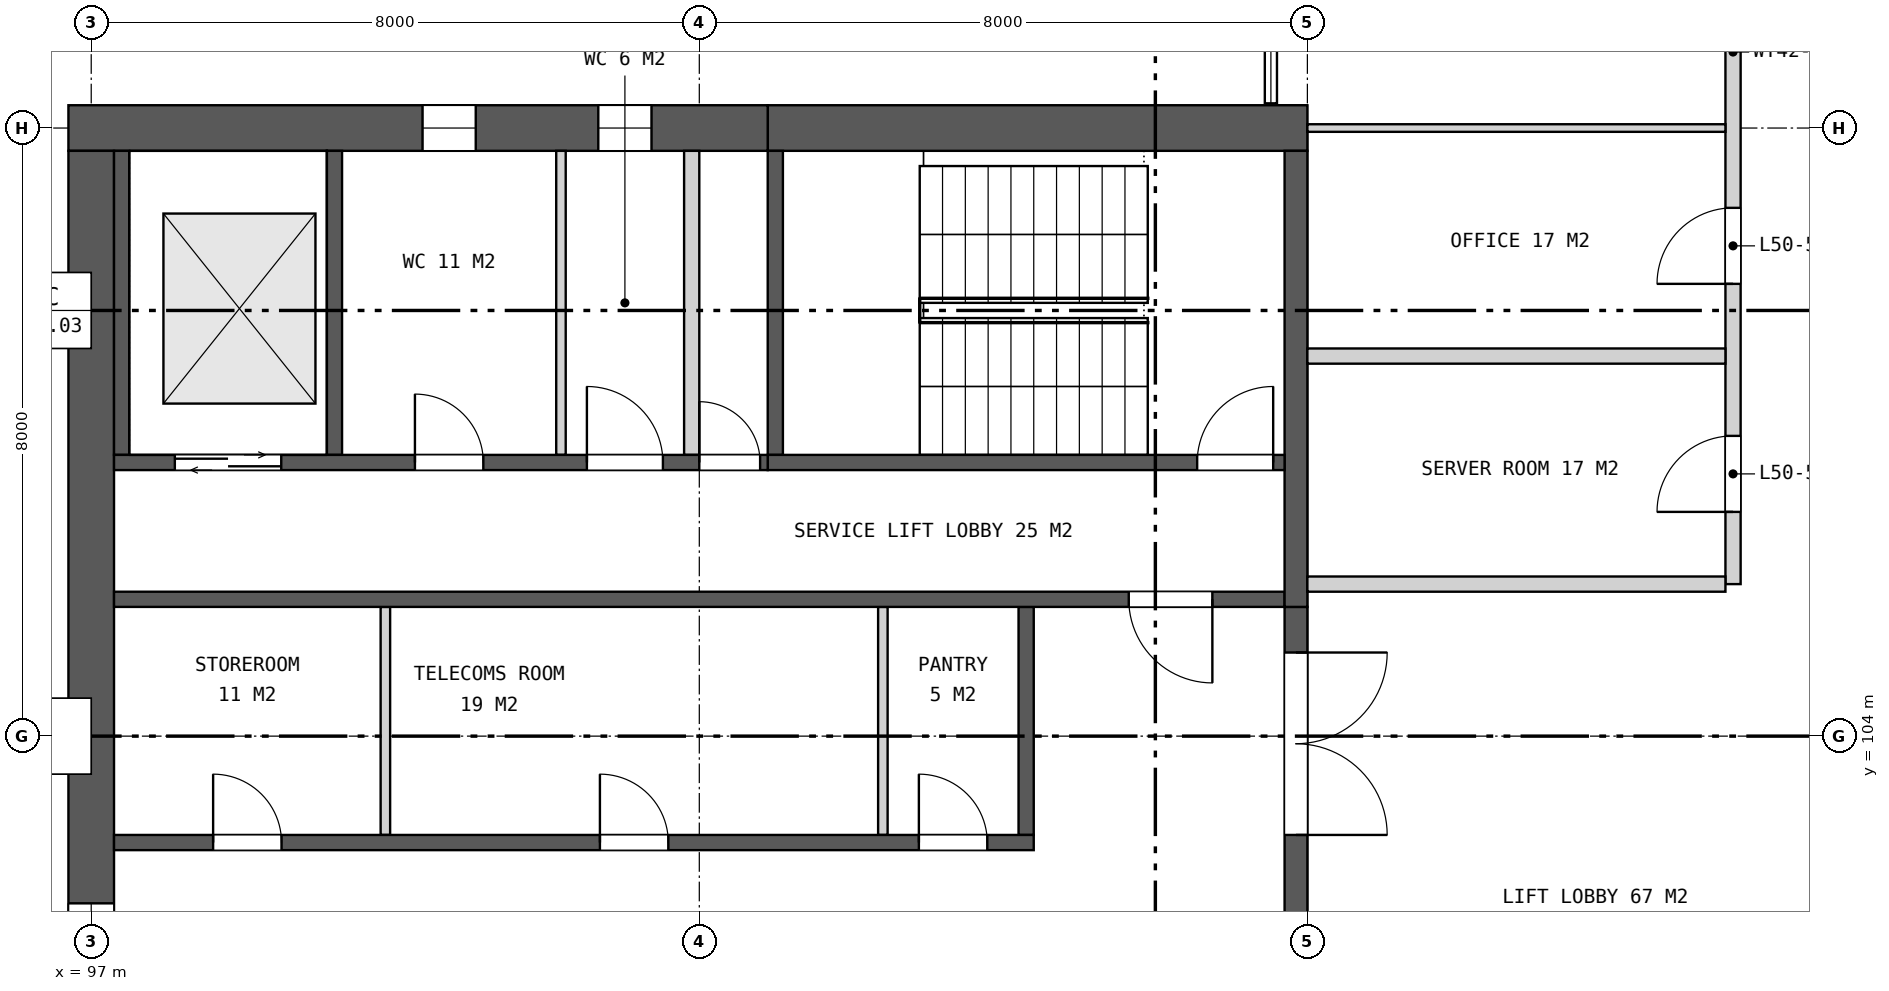
"""IFC4 building model, lengths in metres.
Left out: names, types, materials, properties, quantities, classifications, styles, units other than length and angle.
Written with IfcOpenShell. Run it as: python <this file> out.ifc"""

import sys

from ifc_helpers import new_model, si_unit, direction, frame, frame_2d, origin, place, context, subcontext, project, spatial, rectangle, extrude, element, fill, save


model = new_model("IFC4")
c1 = context("Model", 3, precision=1e-05, world=origin(), true_north=direction((0.0, 1.0)))
c2 = subcontext(c1, "Body", "Model", "MODEL_VIEW")
j1 = project(units=[si_unit("LENGTHUNIT", "METRE"), si_unit("PLANEANGLEUNIT", "RADIAN")], contexts=[c1])
p1 = place(None, origin())
s1 = spatial("IfcSite", under=j1, at=p1, CompositionType="ELEMENT")
p2 = place(p1, origin())
s2 = spatial("IfcBuilding", under=s1, at=p2, CompositionType="ELEMENT")
p3 = place(p2, frame((0.0, 0.0, 233.5)))
s3 = spatial("IfcBuildingStorey", under=s2, at=p3, CompositionType="ELEMENT", Elevation=233.5)
p4 = place(p3, frame((113.0, 112.0, 0.0), z_axis=(0.0, 0.0, 1.0), x_axis=(-1.0, 0.0, 0.0)))
e1 = element("IfcWall", 1, at=p4, inside=s3, PredefinedType="SHEAR", context=c2, shape_type="SweptSolid", body=[
    extrude(rectangle(XDim=7.1, YDim=0.6, at=frame_2d((3.55, 0.0))), origin(), (0.0, 0.0, 1.0), 4.2),
])
p5 = place(p3, frame((105.9, 112.0, 0.0), z_axis=(0.0, 0.0, 1.0), x_axis=(-1.0, 0.0, 0.0)))
e2 = element("IfcWall", 2, at=p5, inside=s3, PredefinedType="SHEAR", context=c2, shape_type="SweptSolid", body=[
    extrude(rectangle(XDim=9.2, YDim=0.6, at=frame_2d((4.6, 0.0))), origin(), (0.0, 0.0, 1.0), 4.2),
])
p6 = place(p5, frame((1.529, 0.0, 1.5)))
e3 = element("IfcOpeningElement", 3, at=p6, cuts=e2, PredefinedType="OPENING", context=c2, shape_type="SweptSolid", body=[
    extrude(rectangle(XDim=0.7, YDim=0.9, at=frame_2d((0.35, 0.45))), frame((0.0, 0.31, 0.0), z_axis=(0.0, -1.0, 0.0), x_axis=(1.0, 0.0, 0.0)), (0.0, 0.0, 1.0), 0.62),
])
p7 = place(p5, frame((3.841, 0.0, 1.5)))
e4 = element("IfcOpeningElement", 4, at=p7, cuts=e2, PredefinedType="OPENING", context=c2, shape_type="SweptSolid", body=[
    extrude(rectangle(XDim=0.7, YDim=0.9, at=frame_2d((0.35, 0.45))), frame((0.0, 0.31, 0.0), z_axis=(0.0, -1.0, 0.0), x_axis=(1.0, 0.0, 0.0)), (0.0, 0.0, 1.0), 0.62),
])
p8 = place(p3, frame((97.0, 111.7, 0.0), z_axis=(0.0, 0.0, 1.0), x_axis=(0.0, -1.0, 0.0)))
e5 = element("IfcWall", 5, at=p8, inside=s3, PredefinedType="SHEAR", context=c2, shape_type="SweptSolid", body=[
    extrude(rectangle(XDim=23.4, YDim=0.6, at=frame_2d((11.7, 0.0))), origin(), (0.0, 0.0, 1.0), 4.2),
])
p9 = place(p8, frame((9.9, 0.0, 0.15)))
e6 = element("IfcOpeningElement", 6, at=p9, cuts=e5, PredefinedType="OPENING", context=c2, shape_type="SweptSolid", body=[
    extrude(rectangle(XDim=3.6, YDim=3.0, at=frame_2d((1.8, 1.5))), frame((0.0, 0.31, 0.0), z_axis=(0.0, -1.0, 0.0), x_axis=(1.0, 0.0, 0.0)), (0.0, 0.0, 1.0), 0.62),
])
p10 = place(p3, frame((112.85, 105.7, 0.0), z_axis=(0.0, 0.0, 1.0), x_axis=(0.0, -1.0, 0.0)))
e7 = element("IfcWall", 7, at=p10, inside=s3, PredefinedType="SHEAR", context=c2, shape_type="SweptSolid", body=[
    extrude(rectangle(XDim=11.4, YDim=0.3, at=frame_2d((5.7, 0.0))), origin(), (0.0, 0.0, 1.0), 4.2),
])
p11 = place(p10, frame((0.6, 0.0, 0.0)))
e8 = element("IfcOpeningElement", 8, at=p11, cuts=e7, PredefinedType="OPENING", context=c2, shape_type="SweptSolid", body=[
    extrude(rectangle(XDim=2.4, YDim=2.4, at=frame_2d((1.2, 1.2))), frame((0.0, 0.16, 0.0), z_axis=(0.0, -1.0, 0.0), x_axis=(1.0, 0.0, 0.0)), (0.0, 0.0, 1.0), 0.32),
])
p12 = place(p10, frame((4.5, 0.0, 0.0)))
e9 = element("IfcOpeningElement", 9, at=p12, cuts=e7, PredefinedType="OPENING", context=c2, shape_type="SweptSolid", body=[
    extrude(rectangle(XDim=2.4, YDim=2.4, at=frame_2d((1.2, 1.2))), frame((0.0, 0.16, 0.0), z_axis=(0.0, -1.0, 0.0), x_axis=(1.0, 0.0, 0.0)), (0.0, 0.0, 1.0), 0.32),
])
p13 = place(p10, frame((8.4, 0.0, 0.0)))
e10 = element("IfcOpeningElement", 10, at=p13, cuts=e7, PredefinedType="OPENING", context=c2, shape_type="SweptSolid", body=[
    extrude(rectangle(XDim=2.4, YDim=2.4, at=frame_2d((1.2, 1.2))), frame((0.0, 0.16, 0.0), z_axis=(0.0, -1.0, 0.0), x_axis=(1.0, 0.0, 0.0)), (0.0, 0.0, 1.0), 0.32),
])
p14 = place(p3, frame((109.3, 105.7, 0.0), z_axis=(0.0, 0.0, 1.0), x_axis=(0.0, -1.0, 0.0)))
e11 = element("IfcWall", 11, at=p14, inside=s3, PredefinedType="SHEAR", context=c2, shape_type="SweptSolid", body=[
    extrude(rectangle(XDim=3.0, YDim=0.2, at=frame_2d((1.5, 0.0))), origin(), (0.0, 0.0, 1.0), 4.2),
])
for number, where, z_axis, x_axis in (
    (12, (107.415, 105.7, 0.0), (0.0, 0.0, 1.0), (0.0, -1.0, 0.0)),
    (13, (100.87, 105.7, 0.0), (0.0, 0.0, 1.0), (0.0, -1.0, 0.0)),
):
    element("IfcWall", number, at=place(p3, frame(where, z_axis=z_axis, x_axis=x_axis)), inside=s3, PredefinedType="PARTITIONING", context=c2, shape_type="SweptSolid", body=[
        extrude(rectangle(XDim=3.0, YDim=0.125, at=frame_2d((1.5, 0.0))), origin(), (0.0, 0.0, 1.0), 4.2),
    ])
p15 = place(p3, frame((109.4, 102.6, 0.0), z_axis=(0.0, 0.0, 1.0), x_axis=(-1.0, 0.0, 0.0)))
e14 = element("IfcWall", 14, at=p15, inside=s3, PredefinedType="SHEAR", context=c2, shape_type="SweptSolid", body=[
    extrude(rectangle(XDim=12.1, YDim=0.2, at=frame_2d((6.05, 0.0))), origin(), (0.0, 0.0, 1.0), 4.2),
])
p16 = place(p15, frame((0.611, 0.0, 0.0)))
e15 = element("IfcOpeningElement", 15, at=p16, cuts=e14, PredefinedType="OPENING", context=c2, shape_type="SweptSolid", body=[
    extrude(rectangle(XDim=0.9, YDim=2.1, at=frame_2d((0.45, 1.05))), frame((0.0, 0.11, 0.0), z_axis=(0.0, -1.0, 0.0), x_axis=(1.0, 0.0, 0.0)), (0.0, 0.0, 1.0), 0.22),
])
p17 = place(p15, frame((4.808, 0.0, 0.0)))
e16 = element("IfcOpeningElement", 16, at=p17, cuts=e14, PredefinedType="OPENING", context=c2, shape_type="SweptSolid", body=[
    extrude(rectangle(XDim=0.9, YDim=2.1, at=frame_2d((0.45, 1.05))), frame((0.0, 0.11, 0.0), z_axis=(0.0, -1.0, 0.0), x_axis=(1.0, 0.0, 0.0)), (0.0, 0.0, 1.0), 0.22),
])
p18 = place(p15, frame((9.896, 0.0, 0.0)))
e17 = element("IfcOpeningElement", 17, at=p18, cuts=e14, PredefinedType="OPENING", context=c2, shape_type="SweptSolid", body=[
    extrude(rectangle(XDim=0.9, YDim=2.1, at=frame_2d((0.45, 1.05))), frame((0.0, 0.11, 0.0), z_axis=(0.0, -1.0, 0.0), x_axis=(1.0, 0.0, 0.0)), (0.0, 0.0, 1.0), 0.22),
])
p19 = place(p3, frame((112.7, 105.8, 0.0), z_axis=(0.0, 0.0, 1.0), x_axis=(-1.0, 0.0, 0.0)))
e18 = element("IfcWall", 18, at=p19, inside=s3, PredefinedType="SHEAR", context=c2, shape_type="SweptSolid", body=[
    extrude(rectangle(XDim=15.4, YDim=0.2, at=frame_2d((7.7, 0.0))), origin(), (0.0, 0.0, 1.0), 4.2),
])
p20 = place(p19, frame((0.95, 0.0, 0.0)))
e19 = element("IfcOpeningElement", 19, at=p20, cuts=e18, PredefinedType="OPENING", context=c2, shape_type="SweptSolid", body=[
    extrude(rectangle(XDim=1.1, YDim=2.1, at=frame_2d((0.55, 1.05))), frame((0.0, 0.11, 0.0), z_axis=(0.0, -1.0, 0.0), x_axis=(1.0, 0.0, 0.0)), (0.0, 0.0, 1.0), 0.22),
])
p21 = place(p3, frame((112.85, 111.7, 0.0), z_axis=(0.0, 0.0, 1.0), x_axis=(0.0, -1.0, 0.0)))
e20 = element("IfcWall", 20, at=p21, inside=s3, PredefinedType="SHEAR", context=c2, shape_type="SweptSolid", body=[
    extrude(rectangle(XDim=6.0, YDim=0.3, at=frame_2d((3.0, 0.0))), origin(), (0.0, 0.0, 1.0), 4.2),
])
for number, where, z_axis, x_axis in (
    (21, (106.0, 111.7, 0.0), (0.0, 0.0, 1.0), (0.0, -1.0, 0.0)),
    (22, (100.2, 111.7, 0.0), (0.0, 0.0, 1.0), (0.0, -1.0, 0.0)),
    (23, (97.4, 111.7, 0.0), (0.0, 0.0, 1.0), (0.0, -1.0, 0.0)),
):
    element("IfcWall", number, at=place(p3, frame(where, z_axis=z_axis, x_axis=x_axis)), inside=s3, PredefinedType="SHEAR", context=c2, shape_type="SweptSolid", body=[
        extrude(rectangle(XDim=4.0, YDim=0.2, at=frame_2d((2.0, 0.0))), origin(), (0.0, 0.0, 1.0), 4.2),
    ])
p22 = place(p3, frame((104.9, 111.7, 0.0), z_axis=(0.0, 0.0, 1.0), x_axis=(0.0, -1.0, 0.0)))
e24 = element("IfcWall", 24, at=p22, inside=s3, PredefinedType="PARTITIONING", context=c2, shape_type="SweptSolid", body=[
    extrude(rectangle(XDim=4.0, YDim=0.2, at=frame_2d((2.0, 0.0))), origin(), (0.0, 0.0, 1.0), 4.2),
])
p23 = place(p3, frame((103.18, 111.7, 0.0), z_axis=(0.0, 0.0, 1.0), x_axis=(0.0, -1.0, 0.0)))
e25 = element("IfcWall", 25, at=p23, inside=s3, PredefinedType="PARTITIONING", context=c2, shape_type="SweptSolid", body=[
    extrude(rectangle(XDim=4.0, YDim=0.125, at=frame_2d((2.0, 0.0))), origin(), (0.0, 0.0, 1.0), 4.2),
])
p24 = place(p3, frame((112.7, 107.6, 0.0), z_axis=(0.0, 0.0, 1.0), x_axis=(-1.0, 0.0, 0.0)))
e26 = element("IfcWall", 26, at=p24, inside=s3, PredefinedType="SHEAR", context=c2, shape_type="SweptSolid", body=[
    extrude(rectangle(XDim=6.8, YDim=0.2, at=frame_2d((3.4, 0.0))), origin(), (0.0, 0.0, 1.0), 4.2),
])
p25 = place(p24, frame((0.15, 0.0, 0.0)))
e27 = element("IfcOpeningElement", 27, at=p25, cuts=e26, PredefinedType="OPENING", context=c2, shape_type="SweptSolid", body=[
    extrude(rectangle(XDim=1.0, YDim=2.1, at=frame_2d((0.5, 1.05))), frame((0.0, 0.11, 0.0), z_axis=(0.0, -1.0, 0.0), x_axis=(1.0, 0.0, 0.0)), (0.0, 0.0, 1.0), 0.22),
])
p26 = place(p3, frame((105.9, 107.6, 0.0), z_axis=(0.0, 0.0, 1.0), x_axis=(-1.0, 0.0, 0.0)))
e28 = element("IfcWall", 28, at=p26, inside=s3, PredefinedType="SHEAR", context=c2, shape_type="SweptSolid", body=[
    extrude(rectangle(XDim=8.6, YDim=0.2, at=frame_2d((4.3, 0.0))), origin(), (0.0, 0.0, 1.0), 4.2),
])
p27 = place(p26, frame((0.1, 0.0, 0.0)))
e29 = element("IfcOpeningElement", 29, at=p27, cuts=e28, PredefinedType="OPENING", context=c2, shape_type="SweptSolid", body=[
    extrude(rectangle(XDim=0.8, YDim=2.1, at=frame_2d((0.4, 1.05))), frame((0.0, 0.11, 0.0), z_axis=(0.0, -1.0, 0.0), x_axis=(1.0, 0.0, 0.0)), (0.0, 0.0, 1.0), 0.22),
])
p28 = place(p26, frame((1.379, 0.0, 0.0)))
e30 = element("IfcOpeningElement", 30, at=p28, cuts=e28, PredefinedType="OPENING", context=c2, shape_type="SweptSolid", body=[
    extrude(rectangle(XDim=1.0, YDim=2.1, at=frame_2d((0.5, 1.05))), frame((0.0, 0.11, 0.0), z_axis=(0.0, -1.0, 0.0), x_axis=(1.0, 0.0, 0.0)), (0.0, 0.0, 1.0), 0.22),
])
p29 = place(p26, frame((3.741, 0.0, 0.0)))
e31 = element("IfcOpeningElement", 31, at=p29, cuts=e28, PredefinedType="OPENING", context=c2, shape_type="SweptSolid", body=[
    extrude(rectangle(XDim=0.9, YDim=2.1, at=frame_2d((0.45, 1.05))), frame((0.0, 0.11, 0.0), z_axis=(0.0, -1.0, 0.0), x_axis=(1.0, 0.0, 0.0)), (0.0, 0.0, 1.0), 0.22),
])
p30 = place(p26, frame((6.4, 0.0, 0.0)))
e32 = element("IfcOpeningElement", 32, at=p30, cuts=e28, PredefinedType="OPENING", context=c2, shape_type="SweptSolid", body=[
    extrude(rectangle(XDim=1.4, YDim=2.1, at=frame_2d((0.7, 1.05))), frame((0.0, 0.11, 0.0), z_axis=(0.0, -1.0, 0.0), x_axis=(1.0, 0.0, 0.0)), (0.0, 0.0, 1.0), 0.22),
])
p31 = place(p3, frame((118.6, 106.0, 0.0), z_axis=(0.0, 0.0, 1.0), x_axis=(0.0, 1.0, 0.0)))
e33 = element("IfcWall", 33, at=p31, inside=s3, PredefinedType="SOLIDWALL", context=c2, shape_type="SweptSolid", body=[
    extrude(rectangle(XDim=14.0, YDim=0.2, at=frame_2d((7.0, 0.0))), origin(), (0.0, 0.0, 1.0), 3.255),
])
p32 = place(p31, frame((0.95, 0.0, 0.0)))
e34 = element("IfcOpeningElement", 34, at=p32, cuts=e33, PredefinedType="OPENING", context=c2, shape_type="SweptSolid", body=[
    extrude(rectangle(XDim=1.0, YDim=2.1, at=frame_2d((0.5, 1.05))), frame((0.0, 0.11, 0.0), z_axis=(0.0, -1.0, 0.0), x_axis=(1.0, 0.0, 0.0)), (0.0, 0.0, 1.0), 0.22),
])
p33 = place(p31, frame((3.95, 0.0, 0.0)))
e35 = element("IfcOpeningElement", 35, at=p33, cuts=e33, PredefinedType="OPENING", context=c2, shape_type="SweptSolid", body=[
    extrude(rectangle(XDim=1.0, YDim=2.1, at=frame_2d((0.5, 1.05))), frame((0.0, 0.11, 0.0), z_axis=(0.0, -1.0, 0.0), x_axis=(1.0, 0.0, 0.0)), (0.0, 0.0, 1.0), 0.22),
])
p34 = place(p31, frame((9.45, 0.0, 0.0)))
e36 = element("IfcOpeningElement", 36, at=p34, cuts=e33, PredefinedType="OPENING", context=c2, shape_type="SweptSolid", body=[
    extrude(rectangle(XDim=1.0, YDim=2.1, at=frame_2d((0.5, 1.05))), frame((0.0, 0.11, 0.0), z_axis=(0.0, -1.0, 0.0), x_axis=(1.0, 0.0, 0.0)), (0.0, 0.0, 1.0), 0.22),
])
for number, where, z_axis, x_axis in (
    (37, (113.0, 106.0, 0.0), (0.0, 0.0, 1.0), (1.0, 0.0, 0.0)),
    (38, (113.0, 109.0, 0.0), (0.0, 0.0, 1.0), (1.0, 0.0, 0.0)),
):
    element("IfcWall", number, at=place(p3, frame(where, z_axis=z_axis, x_axis=x_axis)), inside=s3, PredefinedType="SOLIDWALL", context=c2, shape_type="SweptSolid", body=[
        extrude(rectangle(XDim=5.5, YDim=0.2, at=frame_2d((2.75, 0.0))), origin(), (0.0, 0.0, 1.0), 3.255),
    ])
p35 = place(p3, frame((113.0, 112.0, 0.0), z_axis=(0.0, 0.0, 1.0), x_axis=(1.0, 0.0, 0.0)))
e39 = element("IfcWall", 39, at=p35, inside=s3, PredefinedType="PARTITIONING", context=c2, shape_type="SweptSolid", body=[
    extrude(rectangle(XDim=5.5, YDim=0.1, at=frame_2d((2.75, 0.0))), origin(), (0.0, 0.0, 1.0), 3.255),
])
p36 = place(p6, origin())
e40 = element("IfcWindow", 40, at=p36, inside=s3, PartitioningType="SINGLE_PANEL", PredefinedType="WINDOW", context=c2, shape_type="SweptSolid", body=[
    extrude(rectangle(XDim=0.7, YDim=0.9, at=frame_2d((0.35, 0.45))), frame((0.0, 0.03, 0.0), z_axis=(0.0, -1.0, 0.0), x_axis=(1.0, 0.0, 0.0)), (0.0, 0.0, 1.0), 0.06),
])
fill(e3, e40)
p37 = place(p7, origin())
e41 = element("IfcWindow", 41, at=p37, inside=s3, PartitioningType="SINGLE_PANEL", PredefinedType="WINDOW", context=c2, shape_type="SweptSolid", body=[
    extrude(rectangle(XDim=0.7, YDim=0.9, at=frame_2d((0.35, 0.45))), frame((0.0, 0.03, 0.0), z_axis=(0.0, -1.0, 0.0), x_axis=(1.0, 0.0, 0.0)), (0.0, 0.0, 1.0), 0.06),
])
fill(e4, e41)
p38 = place(p9, origin())
e42 = element("IfcWindow", 42, at=p38, inside=s3, PartitioningType="SINGLE_PANEL", PredefinedType="WINDOW", context=c2, shape_type="SweptSolid", body=[
    extrude(rectangle(XDim=3.6, YDim=3.0, at=frame_2d((1.8, 1.5))), frame((0.0, 0.03, 0.0), z_axis=(0.0, -1.0, 0.0), x_axis=(1.0, 0.0, 0.0)), (0.0, 0.0, 1.0), 0.06),
])
fill(e6, e42)
p39 = place(p11, origin())
e43 = element("IfcDoor", 43, at=p39, inside=s3, OperationType="DOUBLE_DOOR_SINGLE_SWING", PredefinedType="DOOR", context=c2, shape_type="SweptSolid", body=[
    extrude(rectangle(XDim=2.4, YDim=2.4, at=frame_2d((1.2, 1.2))), frame((0.0, 0.025, 0.0), z_axis=(0.0, -1.0, 0.0), x_axis=(1.0, 0.0, 0.0)), (0.0, 0.0, 1.0), 0.05),
])
fill(e8, e43)
p40 = place(p16, frame((0.9, 0.0, 0.0), z_axis=(0.0, 0.0, 1.0), x_axis=(-1.0, 0.0, 0.0)))
e44 = element("IfcDoor", 44, at=p40, inside=s3, OperationType="SINGLE_SWING_LEFT", PredefinedType="DOOR", context=c2, shape_type="SweptSolid", body=[
    extrude(rectangle(XDim=0.9, YDim=2.1, at=frame_2d((0.45, 1.05))), frame((0.0, 0.025, 0.0), z_axis=(0.0, -1.0, 0.0), x_axis=(1.0, 0.0, 0.0)), (0.0, 0.0, 1.0), 0.05),
])
fill(e15, e44)
p41 = place(p17, frame((0.9, 0.0, 0.0), z_axis=(0.0, 0.0, 1.0), x_axis=(-1.0, 0.0, 0.0)))
e45 = element("IfcDoor", 45, at=p41, inside=s3, OperationType="SINGLE_SWING_LEFT", PredefinedType="DOOR", context=c2, shape_type="SweptSolid", body=[
    extrude(rectangle(XDim=0.9, YDim=2.1, at=frame_2d((0.45, 1.05))), frame((0.0, 0.025, 0.0), z_axis=(0.0, -1.0, 0.0), x_axis=(1.0, 0.0, 0.0)), (0.0, 0.0, 1.0), 0.05),
])
fill(e16, e45)
p42 = place(p18, frame((0.9, 0.0, 0.0), z_axis=(0.0, 0.0, 1.0), x_axis=(-1.0, 0.0, 0.0)))
e46 = element("IfcDoor", 46, at=p42, inside=s3, OperationType="SINGLE_SWING_LEFT", PredefinedType="DOOR", context=c2, shape_type="SweptSolid", body=[
    extrude(rectangle(XDim=0.9, YDim=2.1, at=frame_2d((0.45, 1.05))), frame((0.0, 0.025, 0.0), z_axis=(0.0, -1.0, 0.0), x_axis=(1.0, 0.0, 0.0)), (0.0, 0.0, 1.0), 0.05),
])
fill(e17, e46)
p43 = place(p20, origin())
e47 = element("IfcDoor", 47, at=p43, inside=s3, OperationType="SINGLE_SWING_LEFT", PredefinedType="DOOR", context=c2, shape_type="SweptSolid", body=[
    extrude(rectangle(XDim=1.1, YDim=2.1, at=frame_2d((0.55, 1.05))), frame((0.0, 0.025, 0.0), z_axis=(0.0, -1.0, 0.0), x_axis=(1.0, 0.0, 0.0)), (0.0, 0.0, 1.0), 0.05),
])
fill(e19, e47)
p44 = place(p25, frame((1.0, 0.0, 0.0), z_axis=(0.0, 0.0, 1.0), x_axis=(-1.0, 0.0, 0.0)))
e48 = element("IfcDoor", 48, at=p44, inside=s3, OperationType="SINGLE_SWING_RIGHT", PredefinedType="DOOR", context=c2, shape_type="SweptSolid", body=[
    extrude(rectangle(XDim=1.0, YDim=2.1, at=frame_2d((0.5, 1.05))), frame((0.0, 0.025, 0.0), z_axis=(0.0, -1.0, 0.0), x_axis=(1.0, 0.0, 0.0)), (0.0, 0.0, 1.0), 0.05),
])
fill(e27, e48)
p45 = place(p27, frame((0.8, 0.0, 0.0), z_axis=(0.0, 0.0, 1.0), x_axis=(-1.0, 0.0, 0.0)))
e49 = element("IfcDoor", 49, at=p45, inside=s3, OperationType="SINGLE_SWING_LEFT", PredefinedType="DOOR", context=c2, shape_type="SweptSolid", body=[
    extrude(rectangle(XDim=0.8, YDim=2.1, at=frame_2d((0.4, 1.05))), frame((0.0, 0.025, 0.0), z_axis=(0.0, -1.0, 0.0), x_axis=(1.0, 0.0, 0.0)), (0.0, 0.0, 1.0), 0.05),
])
fill(e29, e49)
p46 = place(p28, frame((1.0, 0.0, 0.0), z_axis=(0.0, 0.0, 1.0), x_axis=(-1.0, 0.0, 0.0)))
e50 = element("IfcDoor", 50, at=p46, inside=s3, OperationType="SINGLE_SWING_LEFT", PredefinedType="DOOR", context=c2, shape_type="SweptSolid", body=[
    extrude(rectangle(XDim=1.0, YDim=2.1, at=frame_2d((0.5, 1.05))), frame((0.0, 0.025, 0.0), z_axis=(0.0, -1.0, 0.0), x_axis=(1.0, 0.0, 0.0)), (0.0, 0.0, 1.0), 0.05),
])
fill(e30, e50)
p47 = place(p29, frame((0.9, 0.0, 0.0), z_axis=(0.0, 0.0, 1.0), x_axis=(-1.0, 0.0, 0.0)))
e51 = element("IfcDoor", 51, at=p47, inside=s3, OperationType="SINGLE_SWING_LEFT", PredefinedType="DOOR", context=c2, shape_type="SweptSolid", body=[
    extrude(rectangle(XDim=0.9, YDim=2.1, at=frame_2d((0.45, 1.05))), frame((0.0, 0.025, 0.0), z_axis=(0.0, -1.0, 0.0), x_axis=(1.0, 0.0, 0.0)), (0.0, 0.0, 1.0), 0.05),
])
fill(e31, e51)
p48 = place(p30, origin())
e52 = element("IfcDoor", 52, at=p48, inside=s3, OperationType="DOUBLE_DOOR_SLIDING", PredefinedType="DOOR", context=c2, shape_type="SweptSolid", body=[
    extrude(rectangle(XDim=1.4, YDim=2.1, at=frame_2d((0.7, 1.05))), frame((0.0, 0.025, 0.0), z_axis=(0.0, -1.0, 0.0), x_axis=(1.0, 0.0, 0.0)), (0.0, 0.0, 1.0), 0.05),
])
fill(e32, e52)
p49 = place(p32, origin())
e53 = element("IfcDoor", 53, at=p49, inside=s3, OperationType="SINGLE_SWING_LEFT", PredefinedType="DOOR", context=c2, shape_type="SweptSolid", body=[
    extrude(rectangle(XDim=1.0, YDim=2.1, at=frame_2d((0.5, 1.05))), frame((0.0, 0.025, 0.0), z_axis=(0.0, -1.0, 0.0), x_axis=(1.0, 0.0, 0.0)), (0.0, 0.0, 1.0), 0.05),
])
fill(e34, e53)
p50 = place(p33, origin())
e54 = element("IfcDoor", 54, at=p50, inside=s3, OperationType="SINGLE_SWING_LEFT", PredefinedType="DOOR", context=c2, shape_type="SweptSolid", body=[
    extrude(rectangle(XDim=1.0, YDim=2.1, at=frame_2d((0.5, 1.05))), frame((0.0, 0.025, 0.0), z_axis=(0.0, -1.0, 0.0), x_axis=(1.0, 0.0, 0.0)), (0.0, 0.0, 1.0), 0.05),
])
fill(e35, e54)
save(model, sys.argv[1])
